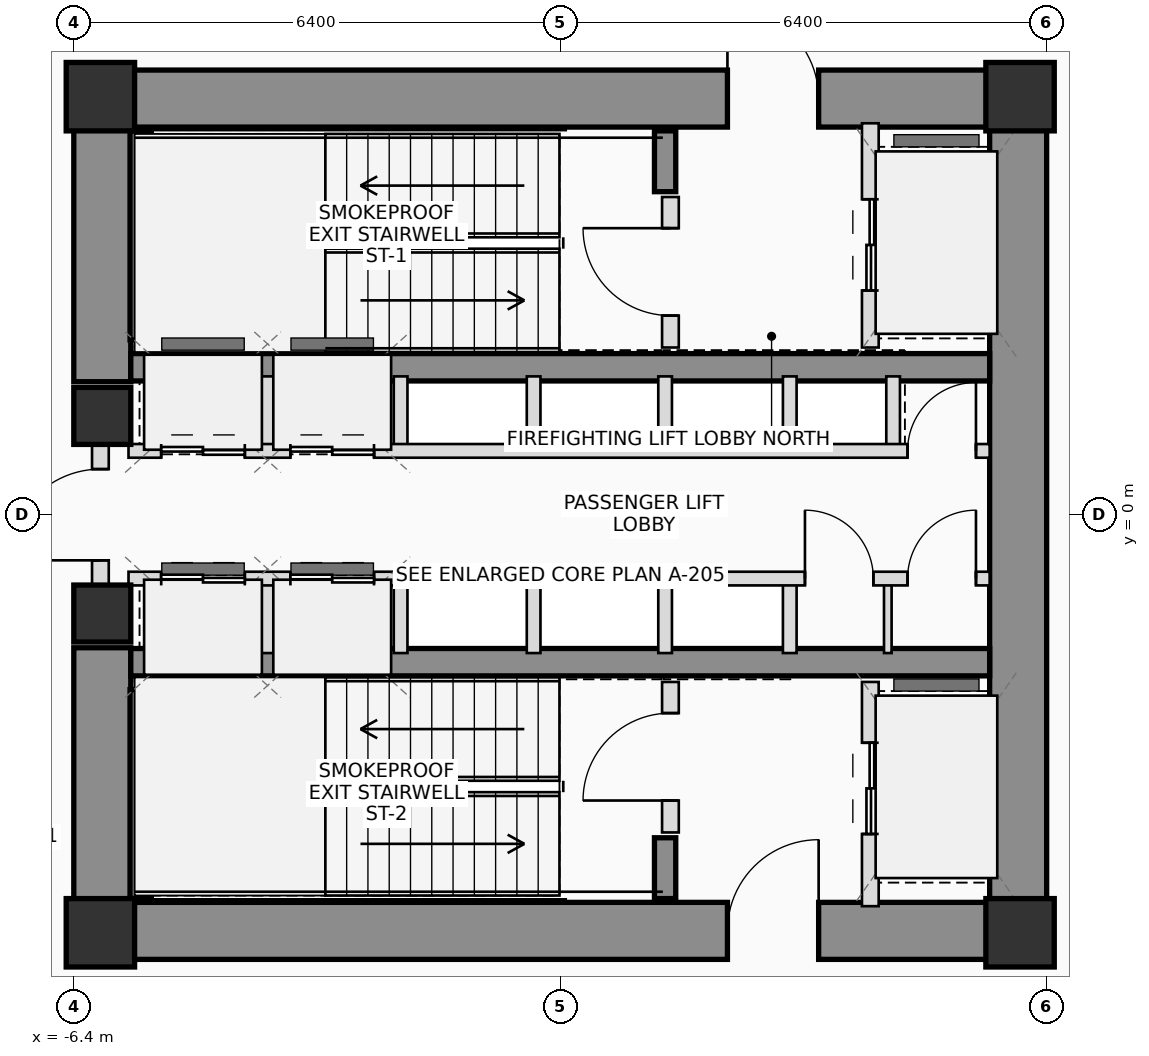
"""IFC4 building model, lengths in metres.
Left out: names, types, materials, properties, quantities, classifications, styles, units other than length and angle.
Written with IfcOpenShell. Run it as: python <this file> out.ifc"""

import sys

from ifc_helpers import new_model, si_unit, direction, frame, frame_2d, origin, origin_2d, place, context, subcontext, project, spatial, rectangle, extrude, source, transform, mapped, element, fill, save


model = new_model("IFC4")
c1 = context("Model", 3, precision=1e-05, world=origin(), true_north=direction((0.0, 1.0)))
c2 = subcontext(c1, "Body", "Model", "MODEL_VIEW")
j1 = project(units=[si_unit("LENGTHUNIT", "METRE"), si_unit("PLANEANGLEUNIT", "RADIAN")], contexts=[c1])
p1 = place(None, origin())
s1 = spatial("IfcSite", under=j1, at=p1, CompositionType="ELEMENT")
p2 = place(p1, origin())
s2 = spatial("IfcBuilding", under=s1, at=p2, CompositionType="ELEMENT")
p3 = place(p2, frame((0.0, 0.0, 46.0)))
s3 = spatial("IfcBuildingStorey", under=s2, at=p3, CompositionType="ELEMENT", Elevation=46.0)
m1 = source(origin(), c2, "Body", "SweptSolid", [
    extrude(rectangle(XDim=0.9, YDim=0.9, at=origin_2d()), origin(), (0.0, 0.0, 1.0), 3.7),
])
for number, where, z_axis, x_axis in (
    (1, (-6.05, -5.5, 0.0), (0.0, 0.0, 1.0), (1.0, 0.0, 0.0)),
    (2, (6.05, -5.5, 0.0), (0.0, 0.0, 1.0), (1.0, 0.0, 0.0)),
    (3, (6.05, 5.5, 0.0), (0.0, 0.0, 1.0), (1.0, 0.0, 0.0)),
    (4, (-6.05, 5.5, 0.0), (0.0, 0.0, 1.0), (1.0, 0.0, 0.0)),
):
    element("IfcColumn", number, at=place(p3, frame(where, z_axis=z_axis, x_axis=x_axis)), inside=s3, PredefinedType="COLUMN", context=c2, shape_type="MappedRepresentation", body=[
        mapped(m1, transform((0.0, 0.0, 0.0), scale=1.0)),
    ])
p4 = place(p3, frame((-6.4, 5.475, 0.0), z_axis=(0.0, 0.0, 1.0), x_axis=(1.0, 0.0, 0.0)))
e5 = element("IfcWall", 5, at=p4, inside=s3, PredefinedType="SHEAR", context=c2, shape_type="SweptSolid", body=[
    extrude(rectangle(XDim=12.8, YDim=0.75, at=frame_2d((6.4, 0.0))), origin(), (0.0, 0.0, 1.0), 3.7),
])
p5 = place(p4, frame((8.6, 0.0, 0.0)))
e6 = element("IfcOpeningElement", 6, at=p5, cuts=e5, PredefinedType="OPENING", context=c2, shape_type="SweptSolid", body=[
    extrude(rectangle(XDim=1.2, YDim=2.2, at=frame_2d((0.6, 1.1))), frame((0.0, 0.385, 0.0), z_axis=(0.0, -1.0, 0.0), x_axis=(1.0, 0.0, 0.0)), (0.0, 0.0, 1.0), 0.77),
])
p6 = place(p3, frame((-6.4, -5.475, 0.0), z_axis=(0.0, 0.0, 1.0), x_axis=(1.0, 0.0, 0.0)))
e7 = element("IfcWall", 7, at=p6, inside=s3, PredefinedType="SHEAR", context=c2, shape_type="SweptSolid", body=[
    extrude(rectangle(XDim=12.8, YDim=0.75, at=frame_2d((6.4, 0.0))), origin(), (0.0, 0.0, 1.0), 3.7),
])
p7 = place(p6, frame((8.6, 0.0, 0.0)))
e8 = element("IfcOpeningElement", 8, at=p7, cuts=e7, PredefinedType="OPENING", context=c2, shape_type="SweptSolid", body=[
    extrude(rectangle(XDim=1.2, YDim=2.2, at=frame_2d((0.6, 1.1))), frame((0.0, 0.385, 0.0), z_axis=(0.0, -1.0, 0.0), x_axis=(1.0, 0.0, 0.0)), (0.0, 0.0, 1.0), 0.77),
])
p8 = place(p3, frame((6.025, -5.1, 0.0), z_axis=(0.0, 0.0, 1.0), x_axis=(0.0, 1.0, 0.0)))
e9 = element("IfcWall", 9, at=p8, inside=s3, PredefinedType="SHEAR", context=c2, shape_type="SweptSolid", body=[
    extrude(rectangle(XDim=10.2, YDim=0.75, at=frame_2d((5.1, 0.0))), origin(), (0.0, 0.0, 1.0), 3.7),
])
for number, where, z_axis, x_axis in (
    (10, (-6.025, -5.1, 0.0), (0.0, 0.0, 1.0), (0.0, 1.0, 0.0)),
    (11, (-6.025, 1.75, 0.0), (0.0, 0.0, 1.0), (0.0, 1.0, 0.0)),
):
    element("IfcWall", number, at=place(p3, frame(where, z_axis=z_axis, x_axis=x_axis)), inside=s3, PredefinedType="SHEAR", context=c2, shape_type="SweptSolid", body=[
        extrude(rectangle(XDim=3.35, YDim=0.75, at=frame_2d((1.675, 0.0))), origin(), (0.0, 0.0, 1.0), 3.7),
    ])
for number, where, z_axis, x_axis in (
    (12, (-5.65, 1.94, 0.0), (0.0, 0.0, 1.0), (1.0, 0.0, 0.0)),
    (13, (-5.65, -1.94, 0.0), (0.0, 0.0, 1.0), (1.0, 0.0, 0.0)),
):
    element("IfcWall", number, at=place(p3, frame(where, z_axis=z_axis, x_axis=x_axis)), inside=s3, PredefinedType="SHEAR", context=c2, shape_type="SweptSolid", body=[
        extrude(rectangle(XDim=11.3, YDim=0.36, at=frame_2d((5.65, 0.0))), origin(), (0.0, 0.0, 1.0), 3.7),
    ])
p9 = place(p3, frame((-5.52, 2.3, 0.0), z_axis=(0.0, 0.0, 1.0), x_axis=(0.0, 1.0, 0.0)))
e14 = element("IfcWall", 14, at=p9, inside=s3, PredefinedType="SHEAR", context=c2, shape_type="SweptSolid", body=[
    extrude(rectangle(XDim=2.75, YDim=0.28, at=frame_2d((1.375, 0.0))), origin(), (0.0, 0.0, 1.0), 3.7),
])
p10 = place(p3, frame((1.38, 4.25, 0.0), z_axis=(0.0, 0.0, 1.0), x_axis=(0.0, 1.0, 0.0)))
e15 = element("IfcWall", 15, at=p10, inside=s3, PredefinedType="SHEAR", context=c2, shape_type="SweptSolid", body=[
    extrude(rectangle(XDim=0.8, YDim=0.28, at=frame_2d((0.4, 0.0))), origin(), (0.0, 0.0, 1.0), 3.7),
])
p11 = place(p3, frame((-5.52, -5.05, 0.0), z_axis=(0.0, 0.0, 1.0), x_axis=(0.0, 1.0, 0.0)))
e16 = element("IfcWall", 16, at=p11, inside=s3, PredefinedType="SHEAR", context=c2, shape_type="SweptSolid", body=[
    extrude(rectangle(XDim=2.75, YDim=0.28, at=frame_2d((1.375, 0.0))), origin(), (0.0, 0.0, 1.0), 3.7),
])
p12 = place(p3, frame((1.38, -5.05, 0.0), z_axis=(0.0, 0.0, 1.0), x_axis=(0.0, 1.0, 0.0)))
e17 = element("IfcWall", 17, at=p12, inside=s3, PredefinedType="SHEAR", context=c2, shape_type="SweptSolid", body=[
    extrude(rectangle(XDim=0.8, YDim=0.28, at=frame_2d((0.4, 0.0))), origin(), (0.0, 0.0, 1.0), 3.7),
])
m2 = source(origin(), c2, "Body", "SweptSolid", [
    extrude(rectangle(XDim=0.75, YDim=0.75, at=origin_2d()), origin(), (0.0, 0.0, 1.0), 3.7),
])
for number, where, z_axis, x_axis in (
    (18, (-6.025, -1.3, 0.0), (0.0, 0.0, 1.0), (1.0, 0.0, 0.0)),
    (19, (-6.025, 1.3, 0.0), (0.0, 0.0, 1.0), (1.0, 0.0, 0.0)),
):
    element("IfcColumn", number, at=place(p3, frame(where, z_axis=z_axis, x_axis=x_axis)), inside=s3, PredefinedType="COLUMN", context=c2, shape_type="MappedRepresentation", body=[
        mapped(m2, transform((0.0, 0.0, 0.0), scale=1.0)),
    ])
p13 = place(p3, frame((-6.05, -0.95, 0.0), z_axis=(0.0, 0.0, 1.0), x_axis=(0.0, 1.0, 0.0)))
e20 = element("IfcWall", 20, at=p13, inside=s3, PredefinedType="PLUMBINGWALL", context=c2, shape_type="SweptSolid", body=[
    extrude(rectangle(XDim=1.9, YDim=0.22, at=frame_2d((0.95, 0.0))), origin(), (0.0, 0.0, 1.0), 2.44),
])
p14 = place(p13, frame((0.35, 0.0, 0.0)))
e21 = element("IfcOpeningElement", 21, at=p14, cuts=e20, PredefinedType="OPENING", context=c2, shape_type="SweptSolid", body=[
    extrude(rectangle(XDim=1.2, YDim=2.2, at=frame_2d((0.6, 1.1))), frame((0.0, 0.12, 0.0), z_axis=(0.0, -1.0, 0.0), x_axis=(1.0, 0.0, 0.0)), (0.0, 0.0, 1.0), 0.24),
])
p15 = place(p3, frame((1.45, 2.2, 0.0), z_axis=(0.0, 0.0, 1.0), x_axis=(0.0, 1.0, 0.0)))
e22 = element("IfcWall", 22, at=p15, inside=s3, PredefinedType="PLUMBINGWALL", context=c2, shape_type="SweptSolid", body=[
    extrude(rectangle(XDim=1.98, YDim=0.22, at=frame_2d((0.99, 0.0))), origin(), (0.0, 0.0, 1.0), 3.46),
])
p16 = place(p15, frame((0.42, 0.0, 0.0)))
e23 = element("IfcOpeningElement", 23, at=p16, cuts=e22, PredefinedType="OPENING", context=c2, shape_type="SweptSolid", body=[
    extrude(rectangle(XDim=1.15, YDim=2.15, at=frame_2d((0.575, 1.075))), frame((0.0, 0.12, 0.0), z_axis=(0.0, -1.0, 0.0), x_axis=(1.0, 0.0, 0.0)), (0.0, 0.0, 1.0), 0.24),
])
p17 = place(p3, frame((4.08, 2.2, 0.0), z_axis=(0.0, 0.0, 1.0), x_axis=(0.0, 1.0, 0.0)))
e24 = element("IfcWall", 24, at=p17, inside=s3, PredefinedType="PLUMBINGWALL", context=c2, shape_type="SweptSolid", body=[
    extrude(rectangle(XDim=2.95, YDim=0.22, at=frame_2d((1.475, 0.0))), origin(), (0.0, 0.0, 1.0), 3.46),
])
p18 = place(p17, frame((0.75, 0.0, 0.0)))
e25 = element("IfcOpeningElement", 25, at=p18, cuts=e24, PredefinedType="OPENING", context=c2, shape_type="SweptSolid", body=[
    extrude(rectangle(XDim=1.2, YDim=2.25, at=frame_2d((0.6, 1.125))), frame((0.0, 0.12, 0.0), z_axis=(0.0, -1.0, 0.0), x_axis=(1.0, 0.0, 0.0)), (0.0, 0.0, 1.0), 0.24),
])
p19 = place(p3, frame((1.45, -4.18, 0.0), z_axis=(0.0, 0.0, 1.0), x_axis=(0.0, 1.0, 0.0)))
e26 = element("IfcWall", 26, at=p19, inside=s3, PredefinedType="PLUMBINGWALL", context=c2, shape_type="SweptSolid", body=[
    extrude(rectangle(XDim=1.98, YDim=0.22, at=frame_2d((0.99, 0.0))), origin(), (0.0, 0.0, 1.0), 3.46),
])
p20 = place(p19, frame((0.42, 0.0, 0.0)))
e27 = element("IfcOpeningElement", 27, at=p20, cuts=e26, PredefinedType="OPENING", context=c2, shape_type="SweptSolid", body=[
    extrude(rectangle(XDim=1.15, YDim=2.15, at=frame_2d((0.575, 1.075))), frame((0.0, 0.12, 0.0), z_axis=(0.0, -1.0, 0.0), x_axis=(1.0, 0.0, 0.0)), (0.0, 0.0, 1.0), 0.24),
])
p21 = place(p3, frame((4.08, -5.15, 0.0), z_axis=(0.0, 0.0, 1.0), x_axis=(0.0, 1.0, 0.0)))
e28 = element("IfcWall", 28, at=p21, inside=s3, PredefinedType="PLUMBINGWALL", context=c2, shape_type="SweptSolid", body=[
    extrude(rectangle(XDim=2.95, YDim=0.22, at=frame_2d((1.475, 0.0))), origin(), (0.0, 0.0, 1.0), 3.46),
])
p22 = place(p21, frame((0.95, 0.0, 0.0)))
e29 = element("IfcOpeningElement", 29, at=p22, cuts=e28, PredefinedType="OPENING", context=c2, shape_type="SweptSolid", body=[
    extrude(rectangle(XDim=1.2, YDim=2.25, at=frame_2d((0.6, 1.125))), frame((0.0, 0.12, 0.0), z_axis=(0.0, -1.0, 0.0), x_axis=(1.0, 0.0, 0.0)), (0.0, 0.0, 1.0), 0.24),
])
for number, where, z_axis, x_axis in (
    (30, (-3.85, 0.84, 0.0), (0.0, 0.0, 1.0), (0.0, 1.0, 0.0)),
    (31, (-3.85, -1.82, 0.0), (0.0, 0.0, 1.0), (0.0, 1.0, 0.0)),
    (32, (-2.1, 0.84, 0.0), (0.0, 0.0, 1.0), (0.0, 1.0, 0.0)),
    (33, (-2.1, -1.82, 0.0), (0.0, 0.0, 1.0), (0.0, 1.0, 0.0)),
    (34, (-0.35, 0.84, 0.0), (0.0, 0.0, 1.0), (0.0, 1.0, 0.0)),
    (35, (-0.35, -1.82, 0.0), (0.0, 0.0, 1.0), (0.0, 1.0, 0.0)),
    (36, (1.38, 0.84, 0.0), (0.0, 0.0, 1.0), (0.0, 1.0, 0.0)),
    (37, (1.38, -1.82, 0.0), (0.0, 0.0, 1.0), (0.0, 1.0, 0.0)),
    (38, (3.02, 0.84, 0.0), (0.0, 0.0, 1.0), (0.0, 1.0, 0.0)),
    (39, (4.38, 0.84, 0.0), (0.0, 0.0, 1.0), (0.0, 1.0, 0.0)),
    (40, (3.02, -1.82, 0.0), (0.0, 0.0, 1.0), (0.0, 1.0, 0.0)),
):
    element("IfcWall", number, at=place(p3, frame(where, z_axis=z_axis, x_axis=x_axis)), inside=s3, PredefinedType="PLUMBINGWALL", context=c2, shape_type="SweptSolid", body=[
        extrude(rectangle(XDim=0.98, YDim=0.18, at=frame_2d((0.49, 0.0))), origin(), (0.0, 0.0, 1.0), 3.46),
    ])
p23 = place(p3, frame((4.31, -1.82, 0.0), z_axis=(0.0, 0.0, 1.0), x_axis=(0.0, 1.0, 0.0)))
e41 = element("IfcWall", 41, at=p23, inside=s3, PredefinedType="PARTITIONING", context=c2, shape_type="SweptSolid", body=[
    extrude(rectangle(XDim=0.98, YDim=0.1, at=frame_2d((0.49, 0.0))), origin(), (0.0, 0.0, 1.0), 3.46),
])
p24 = place(p3, frame((-5.68, 0.84, 0.0), z_axis=(0.0, 0.0, 1.0), x_axis=(1.0, 0.0, 0.0)))
e42 = element("IfcWall", 42, at=p24, inside=s3, PredefinedType="PLUMBINGWALL", context=c2, shape_type="SweptSolid", body=[
    extrude(rectangle(XDim=11.33, YDim=0.18, at=frame_2d((5.665, 0.0))), origin(), (0.0, 0.0, 1.0), 3.46),
])
p25 = place(p24, frame((0.43, 0.0, 0.0)))
e43 = element("IfcOpeningElement", 43, at=p25, cuts=e42, PredefinedType="OPENING", context=c2, shape_type="SweptSolid", body=[
    extrude(rectangle(XDim=1.1, YDim=2.2, at=frame_2d((0.55, 1.1))), frame((0.0, 0.1, 0.0), z_axis=(0.0, -1.0, 0.0), x_axis=(1.0, 0.0, 0.0)), (0.0, 0.0, 1.0), 0.2),
])
p26 = place(p24, frame((2.13, 0.0, 0.0)))
e44 = element("IfcOpeningElement", 44, at=p26, cuts=e42, PredefinedType="OPENING", context=c2, shape_type="SweptSolid", body=[
    extrude(rectangle(XDim=1.1, YDim=2.2, at=frame_2d((0.55, 1.1))), frame((0.0, 0.1, 0.0), z_axis=(0.0, -1.0, 0.0), x_axis=(1.0, 0.0, 0.0)), (0.0, 0.0, 1.0), 0.2),
])
p27 = place(p24, frame((10.25, 0.0, 0.0)))
e45 = element("IfcOpeningElement", 45, at=p27, cuts=e42, PredefinedType="OPENING", context=c2, shape_type="SweptSolid", body=[
    extrude(rectangle(XDim=0.9, YDim=2.05, at=frame_2d((0.45, 1.025))), frame((0.0, 0.1, 0.0), z_axis=(0.0, -1.0, 0.0), x_axis=(1.0, 0.0, 0.0)), (0.0, 0.0, 1.0), 0.2),
])
p28 = place(p3, frame((-5.68, -0.84, 0.0), z_axis=(0.0, 0.0, 1.0), x_axis=(1.0, 0.0, 0.0)))
e46 = element("IfcWall", 46, at=p28, inside=s3, PredefinedType="PLUMBINGWALL", context=c2, shape_type="SweptSolid", body=[
    extrude(rectangle(XDim=11.33, YDim=0.18, at=frame_2d((5.665, 0.0))), origin(), (0.0, 0.0, 1.0), 3.46),
])
p29 = place(p28, frame((0.43, 0.0, 0.0)))
e47 = element("IfcOpeningElement", 47, at=p29, cuts=e46, PredefinedType="OPENING", context=c2, shape_type="SweptSolid", body=[
    extrude(rectangle(XDim=1.1, YDim=2.2, at=frame_2d((0.55, 1.1))), frame((0.0, 0.1, 0.0), z_axis=(0.0, -1.0, 0.0), x_axis=(1.0, 0.0, 0.0)), (0.0, 0.0, 1.0), 0.2),
])
p30 = place(p28, frame((2.13, 0.0, 0.0)))
e48 = element("IfcOpeningElement", 48, at=p30, cuts=e46, PredefinedType="OPENING", context=c2, shape_type="SweptSolid", body=[
    extrude(rectangle(XDim=1.1, YDim=2.2, at=frame_2d((0.55, 1.1))), frame((0.0, 0.1, 0.0), z_axis=(0.0, -1.0, 0.0), x_axis=(1.0, 0.0, 0.0)), (0.0, 0.0, 1.0), 0.2),
])
p31 = place(p28, frame((8.9, 0.0, 0.0)))
e49 = element("IfcOpeningElement", 49, at=p31, cuts=e46, PredefinedType="OPENING", context=c2, shape_type="SweptSolid", body=[
    extrude(rectangle(XDim=0.9, YDim=2.05, at=frame_2d((0.45, 1.025))), frame((0.0, 0.1, 0.0), z_axis=(0.0, -1.0, 0.0), x_axis=(1.0, 0.0, 0.0)), (0.0, 0.0, 1.0), 0.2),
])
p32 = place(p28, frame((10.25, 0.0, 0.0)))
e50 = element("IfcOpeningElement", 50, at=p32, cuts=e46, PredefinedType="OPENING", context=c2, shape_type="SweptSolid", body=[
    extrude(rectangle(XDim=0.9, YDim=2.05, at=frame_2d((0.45, 1.025))), frame((0.0, 0.1, 0.0), z_axis=(0.0, -1.0, 0.0), x_axis=(1.0, 0.0, 0.0)), (0.0, 0.0, 1.0), 0.2),
])
p33 = place(p5, origin())
e51 = element("IfcDoor", 51, at=p33, inside=s3, OperationType="SINGLE_SWING_LEFT", PredefinedType="DOOR", context=c2, shape_type="SweptSolid", body=[
    extrude(rectangle(XDim=1.2, YDim=2.2, at=frame_2d((0.6, 1.1))), frame((0.0, 0.025, 0.0), z_axis=(0.0, -1.0, 0.0), x_axis=(1.0, 0.0, 0.0)), (0.0, 0.0, 1.0), 0.05),
])
fill(e6, e51)
p34 = place(p7, origin())
e52 = element("IfcDoor", 52, at=p34, inside=s3, OperationType="SINGLE_SWING_RIGHT", PredefinedType="DOOR", context=c2, shape_type="SweptSolid", body=[
    extrude(rectangle(XDim=1.2, YDim=2.2, at=frame_2d((0.6, 1.1))), frame((0.0, 0.025, 0.0), z_axis=(0.0, -1.0, 0.0), x_axis=(1.0, 0.0, 0.0)), (0.0, 0.0, 1.0), 0.05),
])
fill(e8, e52)
p35 = place(p14, origin())
e53 = element("IfcDoor", 53, at=p35, inside=s3, OperationType="SINGLE_SWING_LEFT", PredefinedType="DOOR", context=c2, shape_type="SweptSolid", body=[
    extrude(rectangle(XDim=1.2, YDim=2.2, at=frame_2d((0.6, 1.1))), frame((0.0, 0.025, 0.0), z_axis=(0.0, -1.0, 0.0), x_axis=(1.0, 0.0, 0.0)), (0.0, 0.0, 1.0), 0.05),
])
fill(e21, e53)
p36 = place(p16, origin())
e54 = element("IfcDoor", 54, at=p36, inside=s3, OperationType="SINGLE_SWING_RIGHT", PredefinedType="DOOR", context=c2, shape_type="SweptSolid", body=[
    extrude(rectangle(XDim=1.15, YDim=2.15, at=frame_2d((0.575, 1.075))), frame((0.0, 0.025, 0.0), z_axis=(0.0, -1.0, 0.0), x_axis=(1.0, 0.0, 0.0)), (0.0, 0.0, 1.0), 0.05),
])
fill(e23, e54)
p37 = place(p18, origin())
e55 = element("IfcDoor", 55, at=p37, inside=s3, OperationType="DOUBLE_DOOR_SLIDING", PredefinedType="DOOR", context=c2, shape_type="SweptSolid", body=[
    extrude(rectangle(XDim=1.2, YDim=2.25, at=frame_2d((0.6, 1.125))), frame((0.0, 0.025, 0.0), z_axis=(0.0, -1.0, 0.0), x_axis=(1.0, 0.0, 0.0)), (0.0, 0.0, 1.0), 0.05),
])
fill(e25, e55)
p38 = place(p20, origin())
e56 = element("IfcDoor", 56, at=p38, inside=s3, OperationType="SINGLE_SWING_LEFT", PredefinedType="DOOR", context=c2, shape_type="SweptSolid", body=[
    extrude(rectangle(XDim=1.15, YDim=2.15, at=frame_2d((0.575, 1.075))), frame((0.0, 0.025, 0.0), z_axis=(0.0, -1.0, 0.0), x_axis=(1.0, 0.0, 0.0)), (0.0, 0.0, 1.0), 0.05),
])
fill(e27, e56)
p39 = place(p22, origin())
e57 = element("IfcDoor", 57, at=p39, inside=s3, OperationType="DOUBLE_DOOR_SLIDING", PredefinedType="DOOR", context=c2, shape_type="SweptSolid", body=[
    extrude(rectangle(XDim=1.2, YDim=2.25, at=frame_2d((0.6, 1.125))), frame((0.0, 0.025, 0.0), z_axis=(0.0, -1.0, 0.0), x_axis=(1.0, 0.0, 0.0)), (0.0, 0.0, 1.0), 0.05),
])
fill(e29, e57)
p40 = place(p25, origin())
e58 = element("IfcDoor", 58, at=p40, inside=s3, OperationType="DOUBLE_DOOR_SLIDING", PredefinedType="DOOR", context=c2, shape_type="SweptSolid", body=[
    extrude(rectangle(XDim=1.1, YDim=2.2, at=frame_2d((0.55, 1.1))), frame((0.0, 0.025, 0.0), z_axis=(0.0, -1.0, 0.0), x_axis=(1.0, 0.0, 0.0)), (0.0, 0.0, 1.0), 0.05),
])
fill(e43, e58)
p41 = place(p26, origin())
e59 = element("IfcDoor", 59, at=p41, inside=s3, OperationType="DOUBLE_DOOR_SLIDING", PredefinedType="DOOR", context=c2, shape_type="SweptSolid", body=[
    extrude(rectangle(XDim=1.1, YDim=2.2, at=frame_2d((0.55, 1.1))), frame((0.0, 0.025, 0.0), z_axis=(0.0, -1.0, 0.0), x_axis=(1.0, 0.0, 0.0)), (0.0, 0.0, 1.0), 0.05),
])
fill(e44, e59)
p42 = place(p27, origin())
e60 = element("IfcDoor", 60, at=p42, inside=s3, OperationType="SINGLE_SWING_RIGHT", PredefinedType="DOOR", context=c2, shape_type="SweptSolid", body=[
    extrude(rectangle(XDim=0.9, YDim=2.05, at=frame_2d((0.45, 1.025))), frame((0.0, 0.025, 0.0), z_axis=(0.0, -1.0, 0.0), x_axis=(1.0, 0.0, 0.0)), (0.0, 0.0, 1.0), 0.05),
])
fill(e45, e60)
p43 = place(p29, origin())
e61 = element("IfcDoor", 61, at=p43, inside=s3, OperationType="DOUBLE_DOOR_SLIDING", PredefinedType="DOOR", context=c2, shape_type="SweptSolid", body=[
    extrude(rectangle(XDim=1.1, YDim=2.2, at=frame_2d((0.55, 1.1))), frame((0.0, 0.025, 0.0), z_axis=(0.0, -1.0, 0.0), x_axis=(1.0, 0.0, 0.0)), (0.0, 0.0, 1.0), 0.05),
])
fill(e47, e61)
p44 = place(p30, origin())
e62 = element("IfcDoor", 62, at=p44, inside=s3, OperationType="DOUBLE_DOOR_SLIDING", PredefinedType="DOOR", context=c2, shape_type="SweptSolid", body=[
    extrude(rectangle(XDim=1.1, YDim=2.2, at=frame_2d((0.55, 1.1))), frame((0.0, 0.025, 0.0), z_axis=(0.0, -1.0, 0.0), x_axis=(1.0, 0.0, 0.0)), (0.0, 0.0, 1.0), 0.05),
])
fill(e48, e62)
p45 = place(p31, origin())
e63 = element("IfcDoor", 63, at=p45, inside=s3, OperationType="SINGLE_SWING_LEFT", PredefinedType="DOOR", context=c2, shape_type="SweptSolid", body=[
    extrude(rectangle(XDim=0.9, YDim=2.05, at=frame_2d((0.45, 1.025))), frame((0.0, 0.025, 0.0), z_axis=(0.0, -1.0, 0.0), x_axis=(1.0, 0.0, 0.0)), (0.0, 0.0, 1.0), 0.05),
])
fill(e49, e63)
p46 = place(p32, origin())
e64 = element("IfcDoor", 64, at=p46, inside=s3, OperationType="SINGLE_SWING_RIGHT", PredefinedType="DOOR", context=c2, shape_type="SweptSolid", body=[
    extrude(rectangle(XDim=0.9, YDim=2.05, at=frame_2d((0.45, 1.025))), frame((0.0, 0.025, 0.0), z_axis=(0.0, -1.0, 0.0), x_axis=(1.0, 0.0, 0.0)), (0.0, 0.0, 1.0), 0.05),
])
fill(e50, e64)
save(model, sys.argv[1])
